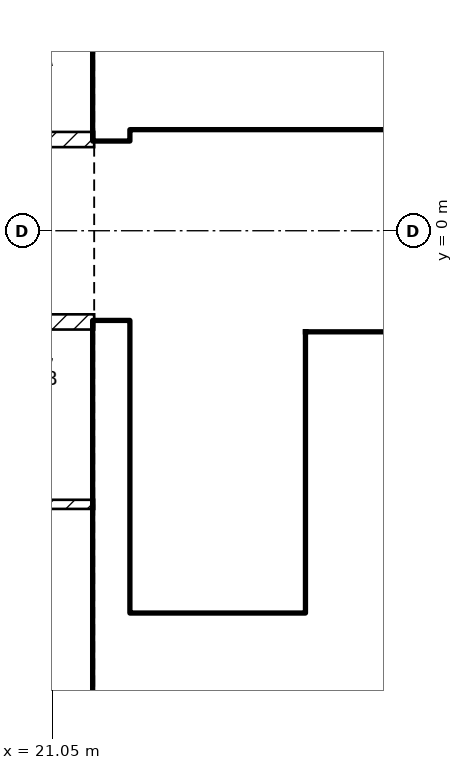
"""IFC4 building model, lengths in metres.
Left out: names, types, materials, properties, quantities, classifications, styles, units other than length and angle.
Written with IfcOpenShell. Run it as: python <this file> out.ifc"""

import sys

from ifc_helpers import new_model, si_unit, direction, frame, frame_2d, origin, place, context, subcontext, project, spatial, rectangle, extrude, element, fill, save


model = new_model("IFC4")
c1 = context("Model", 3, precision=1e-05, world=origin(), true_north=direction((0.0, 1.0)))
c2 = subcontext(c1, "Body", "Model", "MODEL_VIEW")
j1 = project(units=[si_unit("LENGTHUNIT", "METRE"), si_unit("PLANEANGLEUNIT", "RADIAN")], contexts=[c1])
p1 = place(None, origin())
s1 = spatial("IfcSite", under=j1, at=p1, CompositionType="ELEMENT")
p2 = place(p1, origin())
s2 = spatial("IfcBuilding", under=s1, at=p2, CompositionType="ELEMENT")
p3 = place(p2, frame((0.0, 0.0, 260.5)))
s3 = spatial("IfcBuildingStorey", under=s2, at=p3, CompositionType="ELEMENT", Elevation=260.5)
for number, where, z_axis, x_axis in (
    (1, (21.825, -8.1, 0.0), (0.0, 0.0, 1.0), (0.0, 1.0, 0.0)),
    (2, (21.825, 1.2, 0.0), (0.0, 0.0, 1.0), (0.0, 1.0, 0.0)),
):
    element("IfcWall", number, at=place(p3, frame(where, z_axis=z_axis, x_axis=x_axis)), inside=s3, PredefinedType="SHEAR", context=c2, shape_type="SweptSolid", body=[
        extrude(rectangle(XDim=6.9, YDim=0.45, at=frame_2d((3.45, 0.0))), origin(), (0.0, 0.0, 1.0), 3.25),
    ])
p4 = place(p3, frame((22.05, 1.45, 0.0), z_axis=(0.0, 0.0, 1.0), x_axis=(1.0, 0.0, 0.0)))
e3 = element("IfcWall", 3, at=p4, inside=s3, PredefinedType="SOLIDWALL", context=c2, shape_type="SweptSolid", body=[
    extrude(rectangle(XDim=11.3, YDim=0.2, at=frame_2d((5.65, 0.0))), origin(), (0.0, 0.0, 1.0), 3.25),
])
p5 = place(p4, frame((0.75, 0.0, 0.0)))
e4 = element("IfcOpeningElement", 4, at=p5, cuts=e3, PredefinedType="OPENING", context=c2, shape_type="SweptSolid", body=[
    extrude(rectangle(XDim=1.0, YDim=2.1, at=frame_2d((0.5, 1.05))), frame((0.0, 0.11, 0.0), z_axis=(0.0, -1.0, 0.0), x_axis=(1.0, 0.0, 0.0)), (0.0, 0.0, 1.0), 0.22),
])
p6 = place(p4, frame((3.25, 0.0, 0.0)))
e5 = element("IfcOpeningElement", 5, at=p6, cuts=e3, PredefinedType="OPENING", context=c2, shape_type="SweptSolid", body=[
    extrude(rectangle(XDim=1.0, YDim=2.1, at=frame_2d((0.5, 1.05))), frame((0.0, 0.11, 0.0), z_axis=(0.0, -1.0, 0.0), x_axis=(1.0, 0.0, 0.0)), (0.0, 0.0, 1.0), 0.22),
])
p7 = place(p4, frame((9.225, 0.0, 0.0)))
e6 = element("IfcOpeningElement", 6, at=p7, cuts=e3, PredefinedType="OPENING", context=c2, shape_type="SweptSolid", body=[
    extrude(rectangle(XDim=0.9, YDim=2.1, at=frame_2d((0.45, 1.05))), frame((0.0, 0.11, 0.0), z_axis=(0.0, -1.0, 0.0), x_axis=(1.0, 0.0, 0.0)), (0.0, 0.0, 1.0), 0.22),
])
p8 = place(p3, frame((24.5, -5.05, 0.0), z_axis=(0.0, 0.0, 1.0), x_axis=(0.0, 1.0, 0.0)))
e7 = element("IfcWall", 7, at=p8, inside=s3, PredefinedType="SOLIDWALL", context=c2, shape_type="SweptSolid", body=[
    extrude(rectangle(XDim=3.7, YDim=0.2, at=frame_2d((1.85, 0.0))), origin(), (0.0, 0.0, 1.0), 3.25),
])
p9 = place(p8, frame((0.1, 0.0, 0.0)))
e8 = element("IfcOpeningElement", 8, at=p9, cuts=e7, PredefinedType="OPENING", context=c2, shape_type="SweptSolid", body=[
    extrude(rectangle(XDim=0.8, YDim=2.1, at=frame_2d((0.4, 1.05))), frame((0.0, 0.11, 0.0), z_axis=(0.0, -1.0, 0.0), x_axis=(1.0, 0.0, 0.0)), (0.0, 0.0, 1.0), 0.22),
])
p10 = place(p3, frame((22.05, -5.15, 0.0), z_axis=(0.0, 0.0, 1.0), x_axis=(1.0, 0.0, 0.0)))
e9 = element("IfcWall", 9, at=p10, inside=s3, PredefinedType="SOLIDWALL", context=c2, shape_type="SweptSolid", body=[
    extrude(rectangle(XDim=6.3, YDim=0.2, at=frame_2d((3.15, 0.0))), origin(), (0.0, 0.0, 1.0), 3.25),
])
p11 = place(p10, frame((0.2, 0.0, 0.0)))
e10 = element("IfcOpeningElement", 10, at=p11, cuts=e9, PredefinedType="OPENING", context=c2, shape_type="SweptSolid", body=[
    extrude(rectangle(XDim=1.0, YDim=2.1, at=frame_2d((0.5, 1.05))), frame((0.0, 0.11, 0.0), z_axis=(0.0, -1.0, 0.0), x_axis=(1.0, 0.0, 0.0)), (0.0, 0.0, 1.0), 0.22),
])
p12 = place(p3, frame((24.6, -1.45, 0.0), z_axis=(0.0, 0.0, 1.0), x_axis=(1.0, 0.0, 0.0)))
e11 = element("IfcWall", 11, at=p12, inside=s3, PredefinedType="SOLIDWALL", context=c2, shape_type="SweptSolid", body=[
    extrude(rectangle(XDim=8.75, YDim=0.2, at=frame_2d((4.375, 0.0))), origin(), (0.0, 0.0, 1.0), 3.25),
])
p13 = place(p12, frame((0.4, 0.0, 0.0)))
e12 = element("IfcOpeningElement", 12, at=p13, cuts=e11, PredefinedType="OPENING", context=c2, shape_type="SweptSolid", body=[
    extrude(rectangle(XDim=1.0, YDim=2.1, at=frame_2d((0.5, 1.05))), frame((0.0, 0.11, 0.0), z_axis=(0.0, -1.0, 0.0), x_axis=(1.0, 0.0, 0.0)), (0.0, 0.0, 1.0), 0.22),
])
p14 = place(p12, frame((2.4, 0.0, 0.0)))
e13 = element("IfcOpeningElement", 13, at=p14, cuts=e11, PredefinedType="OPENING", context=c2, shape_type="SweptSolid", body=[
    extrude(rectangle(XDim=1.0, YDim=2.1, at=frame_2d((0.5, 1.05))), frame((0.0, 0.11, 0.0), z_axis=(0.0, -1.0, 0.0), x_axis=(1.0, 0.0, 0.0)), (0.0, 0.0, 1.0), 0.22),
])
p15 = place(p12, frame((4.4, 0.0, 0.0)))
e14 = element("IfcOpeningElement", 14, at=p15, cuts=e11, PredefinedType="OPENING", context=c2, shape_type="SweptSolid", body=[
    extrude(rectangle(XDim=1.0, YDim=2.1, at=frame_2d((0.5, 1.05))), frame((0.0, 0.11, 0.0), z_axis=(0.0, -1.0, 0.0), x_axis=(1.0, 0.0, 0.0)), (0.0, 0.0, 1.0), 0.22),
])
p16 = place(p12, frame((6.925, 0.0, 0.0)))
e15 = element("IfcOpeningElement", 15, at=p16, cuts=e11, PredefinedType="OPENING", context=c2, shape_type="SweptSolid", body=[
    extrude(rectangle(XDim=0.9, YDim=2.1, at=frame_2d((0.45, 1.05))), frame((0.0, 0.11, 0.0), z_axis=(0.0, -1.0, 0.0), x_axis=(1.0, 0.0, 0.0)), (0.0, 0.0, 1.0), 0.22),
])
p17 = place(p3, frame((24.6, -3.95, 0.0), z_axis=(0.0, 0.0, 1.0), x_axis=(1.0, 0.0, 0.0)))
e16 = element("IfcWall", 16, at=p17, inside=s3, PredefinedType="SOLIDWALL", context=c2, shape_type="SweptSolid", body=[
    extrude(rectangle(XDim=8.75, YDim=0.2, at=frame_2d((4.375, 0.0))), origin(), (0.0, 0.0, 1.0), 3.25),
])
p18 = place(p3, frame((4.4, 1.2, 0.0), z_axis=(0.0, 0.0, 1.0), x_axis=(1.0, 0.0, 0.0)))
e17 = element("IfcWall", 17, at=p18, inside=s3, PredefinedType="PARTITIONING", context=c2, shape_type="SweptSolid", body=[
    extrude(rectangle(XDim=17.2, YDim=0.2, at=frame_2d((8.6, 0.0))), origin(), (0.0, 0.0, 1.0), 3.25),
])
p19 = place(p18, frame((8.675, 0.0, 0.0)))
e18 = element("IfcOpeningElement", 18, at=p19, cuts=e17, PredefinedType="OPENING", context=c2, shape_type="SweptSolid", body=[
    extrude(rectangle(XDim=1.0, YDim=2.1, at=frame_2d((0.5, 1.05))), frame((0.0, 0.11, 0.0), z_axis=(0.0, -1.0, 0.0), x_axis=(1.0, 0.0, 0.0)), (0.0, 0.0, 1.0), 0.22),
])
p20 = place(p3, frame((21.6, -1.2, 0.0), z_axis=(0.0, 0.0, 1.0), x_axis=(-1.0, 0.0, 0.0)))
e19 = element("IfcWall", 19, at=p20, inside=s3, PredefinedType="PARTITIONING", context=c2, shape_type="SweptSolid", body=[
    extrude(rectangle(XDim=17.2, YDim=0.2, at=frame_2d((8.6, 0.0))), origin(), (0.0, 0.0, 1.0), 3.25),
])
p21 = place(p20, frame((3.85, 0.0, 0.0)))
e20 = element("IfcOpeningElement", 20, at=p21, cuts=e19, PredefinedType="OPENING", context=c2, shape_type="SweptSolid", body=[
    extrude(rectangle(XDim=1.0, YDim=2.1, at=frame_2d((0.5, 1.05))), frame((0.0, 0.11, 0.0), z_axis=(0.0, -1.0, 0.0), x_axis=(1.0, 0.0, 0.0)), (0.0, 0.0, 1.0), 0.22),
])
p22 = place(p3, frame((21.6, -3.6, 0.0), z_axis=(0.0, 0.0, 1.0), x_axis=(-1.0, 0.0, 0.0)))
e21 = element("IfcWall", 21, at=p22, inside=s3, PredefinedType="PARTITIONING", context=c2, shape_type="SweptSolid", body=[
    extrude(rectangle(XDim=9.0, YDim=0.12, at=frame_2d((4.5, 0.0))), origin(), (0.0, 0.0, 1.0), 3.25),
])
p23 = place(p22, frame((4.05, 0.0, 0.0)))
e22 = element("IfcOpeningElement", 22, at=p23, cuts=e21, PredefinedType="OPENING", context=c2, shape_type="SweptSolid", body=[
    extrude(rectangle(XDim=0.9, YDim=2.1, at=frame_2d((0.45, 1.05))), frame((0.0, 0.07, 0.0), z_axis=(0.0, -1.0, 0.0), x_axis=(1.0, 0.0, 0.0)), (0.0, 0.0, 1.0), 0.14),
])
p24 = place(p13, origin())
e23 = element("IfcDoor", 23, at=p24, inside=s3, OperationType="DOUBLE_DOOR_SLIDING", PredefinedType="DOOR", context=c2, shape_type="SweptSolid", body=[
    extrude(rectangle(XDim=1.0, YDim=2.1, at=frame_2d((0.5, 1.05))), frame((0.0, 0.025, 0.0), z_axis=(0.0, -1.0, 0.0), x_axis=(1.0, 0.0, 0.0)), (0.0, 0.0, 1.0), 0.05),
])
fill(e12, e23)
p25 = place(p11, origin())
e24 = element("IfcDoor", 24, at=p25, inside=s3, OperationType="SINGLE_SWING_LEFT", PredefinedType="DOOR", context=c2, shape_type="SweptSolid", body=[
    extrude(rectangle(XDim=1.0, YDim=2.1, at=frame_2d((0.5, 1.05))), frame((0.0, 0.025, 0.0), z_axis=(0.0, -1.0, 0.0), x_axis=(1.0, 0.0, 0.0)), (0.0, 0.0, 1.0), 0.05),
])
fill(e10, e24)
p26 = place(p5, origin())
e25 = element("IfcDoor", 25, at=p26, inside=s3, OperationType="SINGLE_SWING_LEFT", PredefinedType="DOOR", context=c2, shape_type="SweptSolid", body=[
    extrude(rectangle(XDim=1.0, YDim=2.1, at=frame_2d((0.5, 1.05))), frame((0.0, 0.025, 0.0), z_axis=(0.0, -1.0, 0.0), x_axis=(1.0, 0.0, 0.0)), (0.0, 0.0, 1.0), 0.05),
])
fill(e4, e25)
p27 = place(p9, origin())
e26 = element("IfcDoor", 26, at=p27, inside=s3, OperationType="SINGLE_SWING_LEFT", PredefinedType="DOOR", context=c2, shape_type="SweptSolid", body=[
    extrude(rectangle(XDim=0.8, YDim=2.1, at=frame_2d((0.4, 1.05))), frame((0.0, 0.025, 0.0), z_axis=(0.0, -1.0, 0.0), x_axis=(1.0, 0.0, 0.0)), (0.0, 0.0, 1.0), 0.05),
])
fill(e8, e26)
p28 = place(p6, origin())
e27 = element("IfcDoor", 27, at=p28, inside=s3, OperationType="SINGLE_SWING_LEFT", PredefinedType="DOOR", context=c2, shape_type="SweptSolid", body=[
    extrude(rectangle(XDim=1.0, YDim=2.1, at=frame_2d((0.5, 1.05))), frame((0.0, 0.025, 0.0), z_axis=(0.0, -1.0, 0.0), x_axis=(1.0, 0.0, 0.0)), (0.0, 0.0, 1.0), 0.05),
])
fill(e5, e27)
save(model, sys.argv[1])
